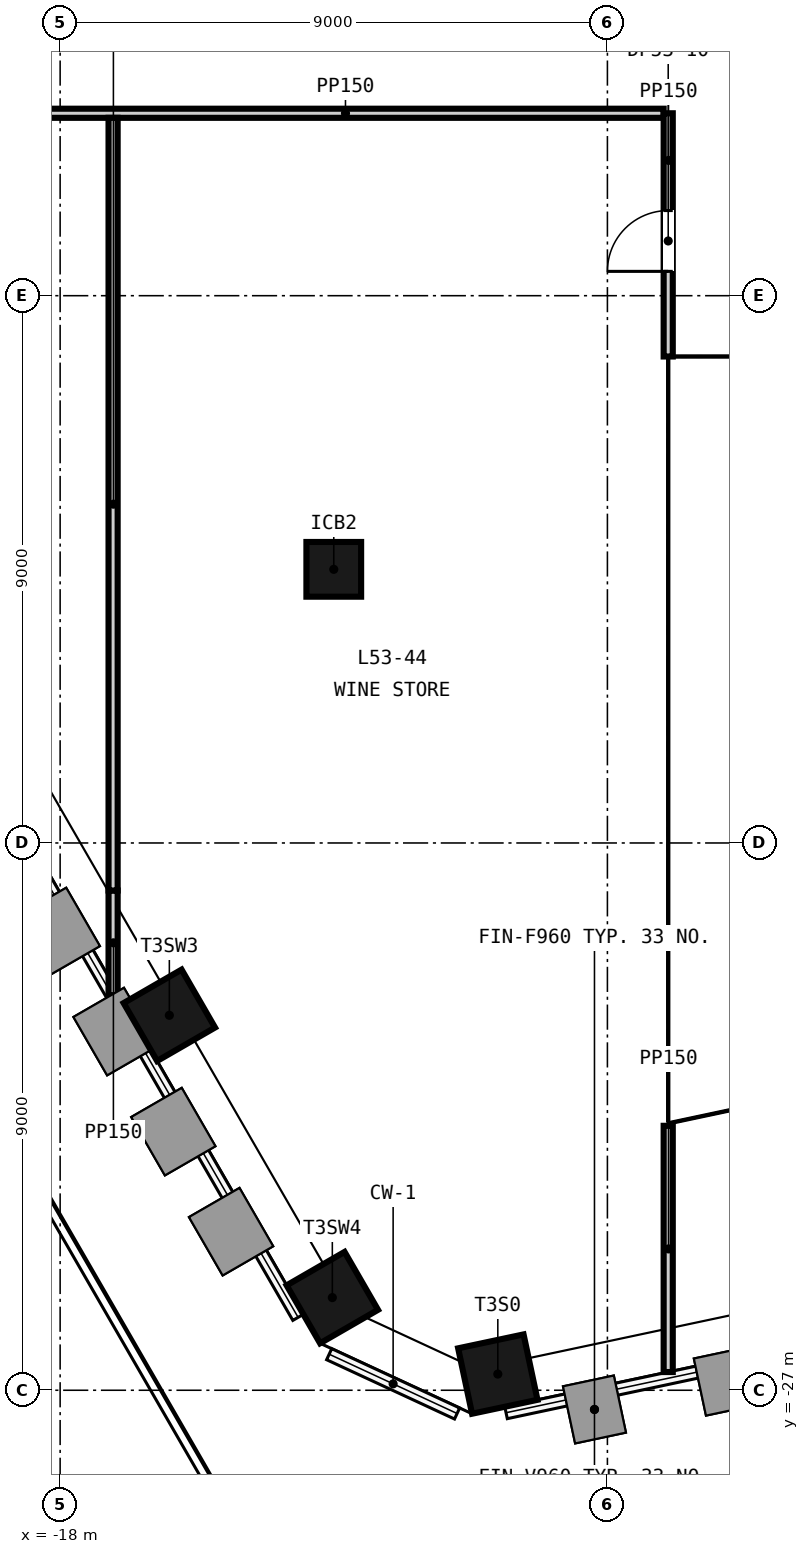
"""IFC4 building model, lengths in metres.
Left out: names, types, materials, properties, quantities, classifications, styles, units other than length and angle.
Written with IfcOpenShell. Run it as: python <this file> out.ifc"""

import sys

from ifc_helpers import new_model, si_unit, direction, frame, frame_2d, origin, origin_2d, place, context, subcontext, project, spatial, rectangle, extrude, element, fill, save


model = new_model("IFC4")
c1 = context("Model", 3, precision=1e-05, world=origin(), true_north=direction((0.0, 1.0)))
c2 = subcontext(c1, "Body", "Model", "MODEL_VIEW")
j1 = project(units=[si_unit("LENGTHUNIT", "METRE"), si_unit("PLANEANGLEUNIT", "RADIAN")], contexts=[c1])
p1 = place(None, origin())
s1 = spatial("IfcSite", under=j1, at=p1, CompositionType="ELEMENT")
p2 = place(p1, origin())
s2 = spatial("IfcBuilding", under=s1, at=p2, CompositionType="ELEMENT")
p3 = place(p2, frame((0.0, 0.0, 211.8)))
s3 = spatial("IfcBuildingStorey", under=s2, at=p3, CompositionType="ELEMENT", Elevation=211.8)
for number, where, z_axis, x_axis in (
    (1, (-16.204, -20.834, -0.3), (0.0, 0.0, 1.0), (0.5, -0.866, 0.0)),
    (2, (-13.524, -25.476, -0.3), (0.0, 0.0, 1.0), (0.5, -0.866, 0.0)),
    (3, (-10.802, -26.734, -0.3), (0.0, 0.0, 1.0), (0.978, 0.208, 0.0)),
):
    element("IfcColumn", number, at=place(p3, frame(where, z_axis=z_axis, x_axis=x_axis)), inside=s3, PredefinedType="COLUMN", context=c2, shape_type="SweptSolid", body=[
        extrude(rectangle(XDim=1.1, YDim=1.1, at=origin_2d()), origin(), (0.0, 0.0, 1.0), 4.65),
    ])
p4 = place(p3, frame((-13.5, -13.5, -0.3), z_axis=(0.0, 0.0, 1.0), x_axis=(1.0, 0.0, 0.0)))
e4 = element("IfcColumn", 4, at=p4, inside=s3, PredefinedType="COLUMN", context=c2, shape_type="SweptSolid", body=[
    extrude(rectangle(XDim=0.9, YDim=0.9, at=origin_2d()), origin(), (0.0, 0.0, 1.0), 4.65),
])
p5 = place(p3, frame((-24.09, -6.0, 0.0), z_axis=(0.0, 0.0, 1.0), x_axis=(1.0, 0.0, 0.0)))
e5 = element("IfcWall", 5, at=p5, inside=s3, PredefinedType="PARTITIONING", context=c2, shape_type="SweptSolid", body=[
    extrude(rectangle(XDim=16.015, YDim=0.15, at=frame_2d((8.007, 0.0))), origin(), (0.0, 0.0, 1.0), 4.35),
])
p6 = place(p5, frame((4.49, 0.0, 0.0)))
e6 = element("IfcOpeningElement", 6, at=p6, cuts=e5, PredefinedType="OPENING", context=c2, shape_type="SweptSolid", body=[
    extrude(rectangle(XDim=1.0, YDim=2.1, at=frame_2d((0.5, 1.05))), frame((0.0, 0.085, 0.0), z_axis=(0.0, -1.0, 0.0), x_axis=(1.0, 0.0, 0.0)), (0.0, 0.0, 1.0), 0.17),
])
p7 = place(p3, frame((-17.129, -20.502, 0.0), z_axis=(0.0, 0.0, 1.0), x_axis=(0.0, 1.0, 0.0)))
e7 = element("IfcWall", 7, at=p7, inside=s3, PredefinedType="PARTITIONING", context=c2, shape_type="SweptSolid", body=[
    extrude(rectangle(XDim=1.721, YDim=0.15, at=frame_2d((0.86, 0.0))), origin(), (0.0, 0.0, 1.0), 3.7),
])
p8 = place(p3, frame((-17.129, -18.782, 0.0), z_axis=(0.0, 0.0, 1.0), x_axis=(0.0, 1.0, 0.0)))
e8 = element("IfcWall", 8, at=p8, inside=s3, PredefinedType="PARTITIONING", context=c2, shape_type="SweptSolid", body=[
    extrude(rectangle(XDim=12.707, YDim=0.15, at=frame_2d((6.354, 0.0))), origin(), (0.0, 0.0, 1.0), 4.35),
])
p9 = place(p3, frame((-8.0, -26.7, 0.0), z_axis=(0.0, 0.0, 1.0), x_axis=(0.0, 1.0, 0.0)))
e9 = element("IfcWall", 9, at=p9, inside=s3, PredefinedType="PARTITIONING", context=c2, shape_type="SweptSolid", body=[
    extrude(rectangle(XDim=4.049, YDim=0.15, at=frame_2d((2.025, 0.0))), origin(), (0.0, 0.0, 1.0), 3.601),
])
p10 = place(p3, frame((-8.0, -10.0, 0.0), z_axis=(0.0, 0.0, 1.0), x_axis=(0.0, 1.0, 0.0)))
e10 = element("IfcWall", 10, at=p10, inside=s3, PredefinedType="PARTITIONING", context=c2, shape_type="SweptSolid", body=[
    extrude(rectangle(XDim=4.0, YDim=0.15, at=frame_2d((2.0, 0.0))), origin(), (0.0, 0.0, 1.0), 3.601),
])
p11 = place(p10, frame((1.4, 0.0, 0.0)))
e11 = element("IfcOpeningElement", 11, at=p11, cuts=e10, PredefinedType="OPENING", context=c2, shape_type="SweptSolid", body=[
    extrude(rectangle(XDim=1.0, YDim=2.1, at=frame_2d((0.5, 1.05))), frame((0.0, 0.085, 0.0), z_axis=(0.0, -1.0, 0.0), x_axis=(1.0, 0.0, 0.0)), (0.0, 0.0, 1.0), 0.17),
])
p12 = place(p11, origin())
e12 = element("IfcDoor", 12, at=p12, inside=s3, OperationType="SINGLE_SWING_LEFT", PredefinedType="DOOR", context=c2, shape_type="SweptSolid", body=[
    extrude(rectangle(XDim=1.0, YDim=2.1, at=frame_2d((0.5, 1.05))), frame((0.0, 0.025, 0.0), z_axis=(0.0, -1.0, 0.0), x_axis=(1.0, 0.0, 0.0)), (0.0, 0.0, 1.0), 0.05),
])
fill(e11, e12)
save(model, sys.argv[1])
